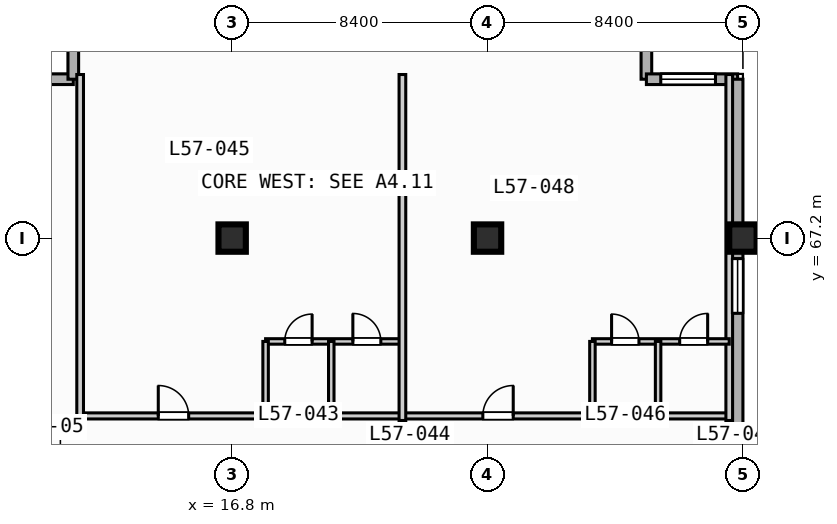
"""IFC4 building model, lengths in metres.
Left out: names, types, materials, properties, quantities, classifications, styles, units other than length and angle.
Written with IfcOpenShell. Run it as: python <this file> out.ifc"""

import sys

from ifc_helpers import new_model, si_unit, direction, frame, frame_2d, origin, origin_2d, place, context, subcontext, project, spatial, rectangle, extrude, element, fill, save


model = new_model("IFC4")
c1 = context("Model", 3, precision=1e-05, world=origin(), true_north=direction((0.0, 1.0)))
c2 = subcontext(c1, "Body", "Model", "MODEL_VIEW")
j1 = project(units=[si_unit("LENGTHUNIT", "METRE"), si_unit("PLANEANGLEUNIT", "RADIAN")], contexts=[c1])
p1 = place(None, origin())
s1 = spatial("IfcSite", under=j1, at=p1, CompositionType="ELEMENT")
p2 = place(p1, origin())
s2 = spatial("IfcBuilding", under=s1, at=p2, CompositionType="ELEMENT")
p3 = place(p2, frame((0.0, 0.0, 234.2)))
s3 = spatial("IfcBuildingStorey", under=s2, at=p3, CompositionType="ELEMENT", Elevation=234.2)
for number, where, z_axis, x_axis in (
    (1, (16.8, 67.2, 0.0), (0.0, 0.0, 1.0), (1.0, 0.0, 0.0)),
    (2, (25.2, 67.2, 0.0), (0.0, 0.0, 1.0), (1.0, 0.0, 0.0)),
    (3, (33.6, 67.2, 0.0), (0.0, 0.0, 1.0), (1.0, 0.0, 0.0)),
):
    element("IfcColumn", number, at=place(p3, frame(where, z_axis=z_axis, x_axis=x_axis)), inside=s3, PredefinedType="COLUMN", context=c2, shape_type="SweptSolid", body=[
        extrude(rectangle(XDim=0.9, YDim=0.9, at=origin_2d()), origin(), (0.0, 0.0, 1.0), 3.7),
    ])
for number, where, z_axis, x_axis in (
    (4, (8.575, 72.425, 0.0), (0.0, 0.0, 1.0), (1.0, 0.0, 0.0)),
    (5, (11.575, 72.425, 0.0), (0.0, 0.0, 1.0), (0.0, 1.0, 0.0)),
    (6, (30.425, 75.425, 0.0), (0.0, 0.0, 1.0), (0.0, -1.0, 0.0)),
):
    element("IfcWall", number, at=place(p3, frame(where, z_axis=z_axis, x_axis=x_axis)), inside=s3, PredefinedType="STANDARD", context=c2, shape_type="SweptSolid", body=[
        extrude(rectangle(XDim=3.0, YDim=0.35, at=frame_2d((1.5, 0.0))), origin(), (0.0, 0.0, 1.0), 3.47),
    ])
p4 = place(p3, frame((30.425, 72.425, 0.0), z_axis=(0.0, 0.0, 1.0), x_axis=(1.0, 0.0, 0.0)))
e7 = element("IfcWall", 7, at=p4, inside=s3, PredefinedType="STANDARD", context=c2, shape_type="SweptSolid", body=[
    extrude(rectangle(XDim=3.0, YDim=0.35, at=frame_2d((1.5, 0.0))), origin(), (0.0, 0.0, 1.0), 3.47),
])
p5 = place(p4, frame((0.472, 0.0, 0.85)))
e8 = element("IfcOpeningElement", 8, at=p5, cuts=e7, PredefinedType="OPENING", context=c2, shape_type="SweptSolid", body=[
    extrude(rectangle(XDim=1.8, YDim=1.8, at=frame_2d((0.9, 0.9))), frame((0.0, 0.185, 0.0), z_axis=(0.0, -1.0, 0.0), x_axis=(1.0, 0.0, 0.0)), (0.0, 0.0, 1.0), 0.37),
])
p6 = place(p3, frame((33.425, 72.425, 0.0), z_axis=(0.0, 0.0, 1.0), x_axis=(0.0, -1.0, 0.0)))
e9 = element("IfcWall", 9, at=p6, inside=s3, PredefinedType="STANDARD", context=c2, shape_type="SweptSolid", body=[
    extrude(rectangle(XDim=39.0, YDim=0.35, at=frame_2d((19.5, 0.0))), origin(), (0.0, 0.0, 1.0), 3.47),
])
p7 = place(p6, frame((5.9, 0.0, 0.85)))
e10 = element("IfcOpeningElement", 10, at=p7, cuts=e9, PredefinedType="OPENING", context=c2, shape_type="SweptSolid", body=[
    extrude(rectangle(XDim=1.8, YDim=1.8, at=frame_2d((0.9, 0.9))), frame((0.0, 0.185, 0.0), z_axis=(0.0, -1.0, 0.0), x_axis=(1.0, 0.0, 0.0)), (0.0, 0.0, 1.0), 0.37),
])
p8 = place(p3, frame((11.8, 61.35, 0.0), z_axis=(0.0, 0.0, 1.0), x_axis=(1.0, 0.0, 0.0)))
e11 = element("IfcWall", 11, at=p8, inside=s3, PredefinedType="PARTITIONING", context=c2, shape_type="SweptSolid", body=[
    extrude(rectangle(XDim=21.35, YDim=0.2, at=frame_2d((10.675, 0.0))), origin(), (0.0, 0.0, 1.0), 3.47),
])
p9 = place(p8, frame((2.57, 0.0, 0.0)))
e12 = element("IfcOpeningElement", 12, at=p9, cuts=e11, PredefinedType="OPENING", context=c2, shape_type="SweptSolid", body=[
    extrude(rectangle(XDim=1.0, YDim=2.15, at=frame_2d((0.5, 1.075))), frame((0.0, 0.11, 0.0), z_axis=(0.0, -1.0, 0.0), x_axis=(1.0, 0.0, 0.0)), (0.0, 0.0, 1.0), 0.22),
])
p10 = place(p8, frame((13.245, 0.0, 0.0)))
e13 = element("IfcOpeningElement", 13, at=p10, cuts=e11, PredefinedType="OPENING", context=c2, shape_type="SweptSolid", body=[
    extrude(rectangle(XDim=1.0, YDim=2.15, at=frame_2d((0.5, 1.075))), frame((0.0, 0.11, 0.0), z_axis=(0.0, -1.0, 0.0), x_axis=(1.0, 0.0, 0.0)), (0.0, 0.0, 1.0), 0.22),
])
p11 = place(p3, frame((11.8, 61.2, 0.0), z_axis=(0.0, 0.0, 1.0), x_axis=(0.0, 1.0, 0.0)))
e14 = element("IfcWall", 14, at=p11, inside=s3, PredefinedType="PARTITIONING", context=c2, shape_type="SweptSolid", body=[
    extrude(rectangle(XDim=11.38, YDim=0.22, at=frame_2d((5.69, 0.0))), origin(), (0.0, 0.0, 1.0), 3.47),
])
p12 = place(p3, frame((17.9, 63.8, 0.0), z_axis=(0.0, 0.0, 1.0), x_axis=(1.0, 0.0, 0.0)))
e15 = element("IfcWall", 15, at=p12, inside=s3, PredefinedType="PLUMBINGWALL", context=c2, shape_type="SweptSolid", body=[
    extrude(rectangle(XDim=4.5, YDim=0.18, at=frame_2d((2.25, 0.0))), origin(), (0.0, 0.0, 1.0), 3.47),
])
p13 = place(p12, frame((0.63, 0.0, 0.0)))
e16 = element("IfcOpeningElement", 16, at=p13, cuts=e15, PredefinedType="OPENING", context=c2, shape_type="SweptSolid", body=[
    extrude(rectangle(XDim=0.9, YDim=2.1, at=frame_2d((0.45, 1.05))), frame((0.0, 0.1, 0.0), z_axis=(0.0, -1.0, 0.0), x_axis=(1.0, 0.0, 0.0)), (0.0, 0.0, 1.0), 0.2),
])
p14 = place(p12, frame((2.87, 0.0, 0.0)))
e17 = element("IfcOpeningElement", 17, at=p14, cuts=e15, PredefinedType="OPENING", context=c2, shape_type="SweptSolid", body=[
    extrude(rectangle(XDim=0.92, YDim=2.1, at=frame_2d((0.46, 1.05))), frame((0.0, 0.1, 0.0), z_axis=(0.0, -1.0, 0.0), x_axis=(1.0, 0.0, 0.0)), (0.0, 0.0, 1.0), 0.2),
])
for number, where, z_axis, x_axis in (
    (18, (17.9, 61.35, 0.0), (0.0, 0.0, 1.0), (0.0, 1.0, 0.0)),
    (19, (20.06, 61.35, 0.0), (0.0, 0.0, 1.0), (0.0, 1.0, 0.0)),
):
    element("IfcWall", number, at=place(p3, frame(where, z_axis=z_axis, x_axis=x_axis)), inside=s3, PredefinedType="PLUMBINGWALL", context=c2, shape_type="SweptSolid", body=[
        extrude(rectangle(XDim=2.45, YDim=0.18, at=frame_2d((1.225, 0.0))), origin(), (0.0, 0.0, 1.0), 3.47),
    ])
for number, where, z_axis, x_axis in (
    (20, (22.4, 61.2, 0.0), (0.0, 0.0, 1.0), (0.0, 1.0, 0.0)),
    (21, (33.15, 61.2, 0.0), (0.0, 0.0, 1.0), (0.0, 1.0, 0.0)),
):
    element("IfcWall", number, at=place(p3, frame(where, z_axis=z_axis, x_axis=x_axis)), inside=s3, PredefinedType="PARTITIONING", context=c2, shape_type="SweptSolid", body=[
        extrude(rectangle(XDim=11.38, YDim=0.22, at=frame_2d((5.69, 0.0))), origin(), (0.0, 0.0, 1.0), 3.47),
    ])
p15 = place(p3, frame((28.65, 63.8, 0.0), z_axis=(0.0, 0.0, 1.0), x_axis=(1.0, 0.0, 0.0)))
e22 = element("IfcWall", 22, at=p15, inside=s3, PredefinedType="PLUMBINGWALL", context=c2, shape_type="SweptSolid", body=[
    extrude(rectangle(XDim=4.5, YDim=0.18, at=frame_2d((2.25, 0.0))), origin(), (0.0, 0.0, 1.0), 3.47),
])
p16 = place(p15, frame((0.63, 0.0, 0.0)))
e23 = element("IfcOpeningElement", 23, at=p16, cuts=e22, PredefinedType="OPENING", context=c2, shape_type="SweptSolid", body=[
    extrude(rectangle(XDim=0.9, YDim=2.1, at=frame_2d((0.45, 1.05))), frame((0.0, 0.1, 0.0), z_axis=(0.0, -1.0, 0.0), x_axis=(1.0, 0.0, 0.0)), (0.0, 0.0, 1.0), 0.2),
])
p17 = place(p15, frame((2.87, 0.0, 0.0)))
e24 = element("IfcOpeningElement", 24, at=p17, cuts=e22, PredefinedType="OPENING", context=c2, shape_type="SweptSolid", body=[
    extrude(rectangle(XDim=0.92, YDim=2.1, at=frame_2d((0.46, 1.05))), frame((0.0, 0.1, 0.0), z_axis=(0.0, -1.0, 0.0), x_axis=(1.0, 0.0, 0.0)), (0.0, 0.0, 1.0), 0.2),
])
for number, where, z_axis, x_axis in (
    (25, (28.65, 61.35, 0.0), (0.0, 0.0, 1.0), (0.0, 1.0, 0.0)),
    (26, (30.81, 61.35, 0.0), (0.0, 0.0, 1.0), (0.0, 1.0, 0.0)),
):
    element("IfcWall", number, at=place(p3, frame(where, z_axis=z_axis, x_axis=x_axis)), inside=s3, PredefinedType="PLUMBINGWALL", context=c2, shape_type="SweptSolid", body=[
        extrude(rectangle(XDim=2.45, YDim=0.18, at=frame_2d((1.225, 0.0))), origin(), (0.0, 0.0, 1.0), 3.47),
    ])
p18 = place(p5, origin())
e27 = element("IfcWindow", 27, at=p18, inside=s3, PartitioningType="SINGLE_PANEL", PredefinedType="WINDOW", context=c2, shape_type="SweptSolid", body=[
    extrude(rectangle(XDim=1.8, YDim=1.8, at=frame_2d((0.9, 0.9))), frame((0.0, 0.03, 0.0), z_axis=(0.0, -1.0, 0.0), x_axis=(1.0, 0.0, 0.0)), (0.0, 0.0, 1.0), 0.06),
])
fill(e8, e27)
p19 = place(p7, origin())
e28 = element("IfcWindow", 28, at=p19, inside=s3, PartitioningType="SINGLE_PANEL", PredefinedType="WINDOW", context=c2, shape_type="SweptSolid", body=[
    extrude(rectangle(XDim=1.8, YDim=1.8, at=frame_2d((0.9, 0.9))), frame((0.0, 0.03, 0.0), z_axis=(0.0, -1.0, 0.0), x_axis=(1.0, 0.0, 0.0)), (0.0, 0.0, 1.0), 0.06),
])
fill(e10, e28)
p20 = place(p9, origin())
e29 = element("IfcDoor", 29, at=p20, inside=s3, OperationType="SINGLE_SWING_LEFT", PredefinedType="DOOR", context=c2, shape_type="SweptSolid", body=[
    extrude(rectangle(XDim=1.0, YDim=2.15, at=frame_2d((0.5, 1.075))), frame((0.0, 0.025, 0.0), z_axis=(0.0, -1.0, 0.0), x_axis=(1.0, 0.0, 0.0)), (0.0, 0.0, 1.0), 0.05),
])
fill(e12, e29)
p21 = place(p10, origin())
e30 = element("IfcDoor", 30, at=p21, inside=s3, OperationType="SINGLE_SWING_RIGHT", PredefinedType="DOOR", context=c2, shape_type="SweptSolid", body=[
    extrude(rectangle(XDim=1.0, YDim=2.15, at=frame_2d((0.5, 1.075))), frame((0.0, 0.025, 0.0), z_axis=(0.0, -1.0, 0.0), x_axis=(1.0, 0.0, 0.0)), (0.0, 0.0, 1.0), 0.05),
])
fill(e13, e30)
p22 = place(p13, origin())
e31 = element("IfcDoor", 31, at=p22, inside=s3, OperationType="SINGLE_SWING_RIGHT", PredefinedType="DOOR", context=c2, shape_type="SweptSolid", body=[
    extrude(rectangle(XDim=0.9, YDim=2.1, at=frame_2d((0.45, 1.05))), frame((0.0, 0.025, 0.0), z_axis=(0.0, -1.0, 0.0), x_axis=(1.0, 0.0, 0.0)), (0.0, 0.0, 1.0), 0.05),
])
fill(e16, e31)
p23 = place(p14, origin())
e32 = element("IfcDoor", 32, at=p23, inside=s3, OperationType="SINGLE_SWING_LEFT", PredefinedType="DOOR", context=c2, shape_type="SweptSolid", body=[
    extrude(rectangle(XDim=0.92, YDim=2.1, at=frame_2d((0.46, 1.05))), frame((0.0, 0.025, 0.0), z_axis=(0.0, -1.0, 0.0), x_axis=(1.0, 0.0, 0.0)), (0.0, 0.0, 1.0), 0.05),
])
fill(e17, e32)
p24 = place(p16, origin())
e33 = element("IfcDoor", 33, at=p24, inside=s3, OperationType="SINGLE_SWING_LEFT", PredefinedType="DOOR", context=c2, shape_type="SweptSolid", body=[
    extrude(rectangle(XDim=0.9, YDim=2.1, at=frame_2d((0.45, 1.05))), frame((0.0, 0.025, 0.0), z_axis=(0.0, -1.0, 0.0), x_axis=(1.0, 0.0, 0.0)), (0.0, 0.0, 1.0), 0.05),
])
fill(e23, e33)
p25 = place(p17, origin())
e34 = element("IfcDoor", 34, at=p25, inside=s3, OperationType="SINGLE_SWING_RIGHT", PredefinedType="DOOR", context=c2, shape_type="SweptSolid", body=[
    extrude(rectangle(XDim=0.92, YDim=2.1, at=frame_2d((0.46, 1.05))), frame((0.0, 0.025, 0.0), z_axis=(0.0, -1.0, 0.0), x_axis=(1.0, 0.0, 0.0)), (0.0, 0.0, 1.0), 0.05),
])
fill(e24, e34)
save(model, sys.argv[1])
